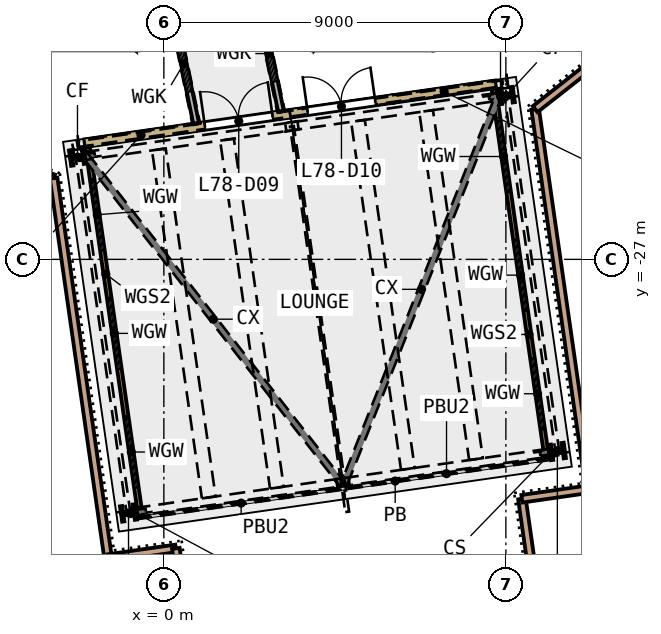
"""IFC4 building model, lengths in metres.
Left out: names, types, materials, properties, quantities, classifications, styles, units other than length and angle.
Written with IfcOpenShell. Run it as: python <this file> out.ifc"""

import sys

from ifc_helpers import new_model, si_unit, direction, frame, frame_2d, origin, origin_2d, place, context, subcontext, project, spatial, polyline, rectangle, i_section, outline, extrude, element, fill, save


model = new_model("IFC4")
c1 = context("Model", 3, precision=1e-05, world=origin(), true_north=direction((0.0, 1.0)))
c2 = subcontext(c1, "Body", "Model", "MODEL_VIEW")
j1 = project(units=[si_unit("LENGTHUNIT", "METRE"), si_unit("PLANEANGLEUNIT", "RADIAN")], contexts=[c1])
p1 = place(None, origin())
s1 = spatial("IfcSite", under=j1, at=p1, CompositionType="ELEMENT")
p2 = place(p1, origin())
s2 = spatial("IfcBuilding", under=s1, at=p2, CompositionType="ELEMENT")
p3 = place(p2, frame((0.0, 0.0, 315.0)))
s3 = spatial("IfcBuildingStorey", under=s2, at=p3, CompositionType="ELEMENT", Elevation=315.0)
for number, where, z_axis, x_axis in (
    (1, (9.012, -22.69, 0.0), (0.0, 0.0, 1.0), (0.142, -0.99, 0.0)),
    (2, (-2.273, -24.308, 0.0), (0.0, 0.0, 1.0), (0.142, -0.99, 0.0)),
    (3, (10.354, -32.055, 0.0), (0.0, 0.0, 1.0), (0.142, -0.99, 0.0)),
    (4, (-0.93, -33.673, 0.0), (0.0, 0.0, 1.0), (0.142, -0.99, 0.0)),
):
    element("IfcColumn", number, at=place(p3, frame(where, z_axis=z_axis, x_axis=x_axis)), inside=s3, PredefinedType="COLUMN", context=c2, shape_type="SweptSolid", body=[
        extrude(i_section(OverallWidth=0.368, OverallDepth=0.356, WebThickness=0.011, FlangeThickness=0.018, FilletRadius=0.015, at=origin_2d()), origin(), (0.0, 0.0, 1.0), 4.5),
    ])
p4 = place(p3, frame((-2.083, -23.943, 0.0), z_axis=(0.0, 0.0, 1.0), x_axis=(0.989877825, 0.141922135, 0.0)))
e5 = element("IfcWall", 5, at=p4, inside=s3, PredefinedType="SOLIDWALL", context=c2, shape_type="SweptSolid", body=[
    extrude(rectangle(XDim=2.73, YDim=0.2, at=frame_2d((1.365, 0.0))), origin(), (0.0, 0.0, 1.0), 2.456),
])
p5 = place(p3, frame((-2.083, -23.943, 2.71), z_axis=(0.0, 0.0, 1.0), x_axis=(0.989877825, 0.141922135, 0.0)))
e6 = element("IfcWall", 6, at=p5, inside=s3, PredefinedType="SOLIDWALL", context=c2, shape_type="SweptSolid", body=[
    extrude(rectangle(XDim=2.73, YDim=0.2, at=frame_2d((1.365, 0.0))), origin(), (0.0, 0.0, 1.0), 1.09),
])
p6 = place(p3, frame((0.62, -23.556, 0.0), z_axis=(0.0, 0.0, 1.0), x_axis=(0.989877825, 0.141922135, 0.0)))
e7 = element("IfcWall", 7, at=p6, inside=s3, PredefinedType="SOLIDWALL", context=c2, shape_type="SweptSolid", body=[
    extrude(rectangle(XDim=2.73, YDim=0.2, at=frame_2d((1.365, 0.0))), origin(), (0.0, 0.0, 1.0), 2.456),
])
p7 = place(p6, frame((0.465, 0.0, 0.0)))
e8 = element("IfcOpeningElement", 8, at=p7, cuts=e7, PredefinedType="OPENING", context=c2, shape_type="SweptSolid", body=[
    extrude(rectangle(XDim=1.8, YDim=2.1, at=frame_2d((0.9, 1.05))), frame((0.0, 0.11, 0.0), z_axis=(0.0, -1.0, 0.0), x_axis=(1.0, 0.0, 0.0)), (0.0, 0.0, 1.0), 0.22),
])
p8 = place(p3, frame((0.62, -23.556, 2.71), z_axis=(0.0, 0.0, 1.0), x_axis=(0.989877825, 0.141922135, 0.0)))
e9 = element("IfcWall", 9, at=p8, inside=s3, PredefinedType="SOLIDWALL", context=c2, shape_type="SweptSolid", body=[
    extrude(rectangle(XDim=2.73, YDim=0.2, at=frame_2d((1.365, 0.0))), origin(), (0.0, 0.0, 1.0), 1.09),
])
p9 = place(p3, frame((3.322, -23.168, 0.0), z_axis=(0.0, 0.0, 1.0), x_axis=(0.989865258, 0.14200976, 0.0)))
e10 = element("IfcWall", 10, at=p9, inside=s3, PredefinedType="SOLIDWALL", context=c2, shape_type="SweptSolid", body=[
    extrude(rectangle(XDim=2.73, YDim=0.2, at=frame_2d((1.365, 0.0))), origin(), (0.0, 0.0, 1.0), 2.456),
])
p10 = place(p9, frame((0.465, 0.0, 0.0)))
e11 = element("IfcOpeningElement", 11, at=p10, cuts=e10, PredefinedType="OPENING", context=c2, shape_type="SweptSolid", body=[
    extrude(rectangle(XDim=1.8, YDim=2.1, at=frame_2d((0.9, 1.05))), frame((0.0, 0.11, 0.0), z_axis=(0.0, -1.0, 0.0), x_axis=(1.0, 0.0, 0.0)), (0.0, 0.0, 1.0), 0.22),
])
p11 = place(p3, frame((3.322, -23.168, 2.71), z_axis=(0.0, 0.0, 1.0), x_axis=(0.989865258, 0.14200976, 0.0)))
e12 = element("IfcWall", 12, at=p11, inside=s3, PredefinedType="SOLIDWALL", context=c2, shape_type="SweptSolid", body=[
    extrude(rectangle(XDim=2.73, YDim=0.2, at=frame_2d((1.365, 0.0))), origin(), (0.0, 0.0, 1.0), 1.09),
])
p12 = place(p3, frame((6.024, -22.781, 0.0), z_axis=(0.0, 0.0, 1.0), x_axis=(0.989877825, 0.141922135, 0.0)))
e13 = element("IfcWall", 13, at=p12, inside=s3, PredefinedType="SOLIDWALL", context=c2, shape_type="SweptSolid", body=[
    extrude(rectangle(XDim=2.73, YDim=0.2, at=frame_2d((1.365, 0.0))), origin(), (0.0, 0.0, 1.0), 2.456),
])
p13 = place(p3, frame((6.024, -22.781, 2.71), z_axis=(0.0, 0.0, 1.0), x_axis=(0.989877825, 0.141922135, 0.0)))
e14 = element("IfcWall", 14, at=p13, inside=s3, PredefinedType="SOLIDWALL", context=c2, shape_type="SweptSolid", body=[
    extrude(rectangle(XDim=2.73, YDim=0.2, at=frame_2d((1.365, 0.0))), origin(), (0.0, 0.0, 1.0), 1.09),
])
p14 = place(p3, frame((-2.083, -23.943, 3.8), z_axis=(0.0, 0.0, 1.0), x_axis=(0.989877825, 0.141922135, 0.0)))
e15 = element("IfcWall", 15, at=p14, inside=s3, PredefinedType="SOLIDWALL", context=c2, shape_type="SweptSolid", body=[
    extrude(outline(polyline([(0.0, 0.0), (5.46, 0.0), (5.46, 8.718), (0.0, 1.327), (0.0, 0.0)])), frame((0.0, 0.1, 0.0), z_axis=(0.0, -1.0, 0.0), x_axis=(1.0, 0.0, 0.0)), (0.0, 0.0, 1.0), 0.2),
])
p15 = place(p3, frame((8.727, -22.393, 3.8), z_axis=(0.0, 0.0, 1.0), x_axis=(-0.989871542, -0.141965948, 0.0)))
e16 = element("IfcWall", 16, at=p15, inside=s3, PredefinedType="SOLIDWALL", context=c2, shape_type="SweptSolid", body=[
    extrude(outline(polyline([(0.0, 0.0), (5.46, 0.0), (5.46, 8.718), (0.0, 1.327), (0.0, 0.0)])), frame((0.0, 0.1, 0.0), z_axis=(0.0, -1.0, 0.0), x_axis=(1.0, 0.0, 0.0)), (0.0, 0.0, 1.0), 0.2),
])
p16 = place(p3, frame((8.682, -22.5, 0.0), z_axis=(0.0, 0.0, 1.0), x_axis=(0.141942912, -0.989874846, 0.0)))
e17 = element("IfcWall", 17, at=p16, inside=s3, PredefinedType="SOLIDWALL", context=c2, shape_type="SweptSolid", body=[
    extrude(outline(polyline([(0.0, 0.0), (9.83, 0.0), (9.836, 5.127), (9.835, 4.229), (9.83, 5.127), (9.556, 4.229), (9.555, 5.127), (0.375, 5.127), (0.374, 4.229), (0.095, 4.229), (0.094, 5.127), (0.0, 5.127), (0.0, 0.0)])), frame((0.0, 0.06, 0.0), z_axis=(0.0, -1.0, 0.0), x_axis=(1.0, 0.0, 0.0)), (0.0, 0.0, 1.0), 0.12),
])
p17 = place(p16, frame((0.861, 0.0, 0.9)))
e18 = element("IfcOpeningElement", 18, at=p17, cuts=e17, PredefinedType="OPENING", context=c2, shape_type="SweptSolid", body=[
    extrude(rectangle(XDim=1.9, YDim=2.2, at=frame_2d((0.95, 1.1))), frame((0.0, 0.07, 0.0), z_axis=(0.0, -1.0, 0.0), x_axis=(1.0, 0.0, 0.0)), (0.0, 0.0, 1.0), 0.14),
])
p18 = place(p16, frame((4.014, 0.0, 0.9)))
e19 = element("IfcOpeningElement", 19, at=p18, cuts=e17, PredefinedType="OPENING", context=c2, shape_type="SweptSolid", body=[
    extrude(rectangle(XDim=1.9, YDim=2.2, at=frame_2d((0.95, 1.1))), frame((0.0, 0.07, 0.0), z_axis=(0.0, -1.0, 0.0), x_axis=(1.0, 0.0, 0.0)), (0.0, 0.0, 1.0), 0.14),
])
p19 = place(p16, frame((7.168, 0.0, 0.9)))
e20 = element("IfcOpeningElement", 20, at=p19, cuts=e17, PredefinedType="OPENING", context=c2, shape_type="SweptSolid", body=[
    extrude(rectangle(XDim=1.9, YDim=2.2, at=frame_2d((0.95, 1.1))), frame((0.0, 0.07, 0.0), z_axis=(0.0, -1.0, 0.0), x_axis=(1.0, 0.0, 0.0)), (0.0, 0.0, 1.0), 0.14),
])
p20 = place(p3, frame((-2.009, -24.034, 0.0), z_axis=(0.0, 0.0, 1.0), x_axis=(0.141922064, -0.989877835, 0.0)))
e21 = element("IfcWall", 21, at=p20, inside=s3, PredefinedType="SOLIDWALL", context=c2, shape_type="SweptSolid", body=[
    extrude(outline(polyline([(0.0, 0.0), (9.83, 0.0), (9.836, 5.127), (9.835, 4.229), (9.83, 5.127), (9.556, 4.229), (9.555, 5.127), (0.375, 5.127), (0.374, 4.229), (0.095, 4.229), (0.094, 5.127), (0.0, 5.127), (0.0, 0.0)])), frame((0.0, 0.06, 0.0), z_axis=(0.0, -1.0, 0.0), x_axis=(1.0, 0.0, 0.0)), (0.0, 0.0, 1.0), 0.12),
])
p21 = place(p20, frame((0.861, 0.0, 0.9)))
e22 = element("IfcOpeningElement", 22, at=p21, cuts=e21, PredefinedType="OPENING", context=c2, shape_type="SweptSolid", body=[
    extrude(rectangle(XDim=1.9, YDim=2.2, at=frame_2d((0.95, 1.1))), frame((0.0, 0.07, 0.0), z_axis=(0.0, -1.0, 0.0), x_axis=(1.0, 0.0, 0.0)), (0.0, 0.0, 1.0), 0.14),
])
p22 = place(p20, frame((4.014, 0.0, 0.9)))
e23 = element("IfcOpeningElement", 23, at=p22, cuts=e21, PredefinedType="OPENING", context=c2, shape_type="SweptSolid", body=[
    extrude(rectangle(XDim=1.9, YDim=2.2, at=frame_2d((0.95, 1.1))), frame((0.0, 0.07, 0.0), z_axis=(0.0, -1.0, 0.0), x_axis=(1.0, 0.0, 0.0)), (0.0, 0.0, 1.0), 0.14),
])
p23 = place(p20, frame((7.168, 0.0, 0.9)))
e24 = element("IfcOpeningElement", 24, at=p23, cuts=e21, PredefinedType="OPENING", context=c2, shape_type="SweptSolid", body=[
    extrude(rectangle(XDim=1.9, YDim=2.2, at=frame_2d((0.95, 1.1))), frame((0.0, 0.07, 0.0), z_axis=(0.0, -1.0, 0.0), x_axis=(1.0, 0.0, 0.0)), (0.0, 0.0, 1.0), 0.14),
])
p24 = place(p3, frame((-14.996, -20.016, 0.0), z_axis=(0.0, 0.0, 1.0), x_axis=(0.928228401, -0.372010801, 0.0)))
e25 = element("IfcWall", 25, at=p24, inside=s3, PredefinedType="SOLIDWALL", context=c2, shape_type="SweptSolid", body=[
    extrude(rectangle(XDim=13.031, YDim=0.2, at=frame_2d((6.516, 0.0))), origin(), (0.0, 0.0, 1.0), 0.45),
])
p25 = place(p3, frame((-2.9, -24.864, 0.0), z_axis=(0.0, 0.0, 1.0), x_axis=(0.141925608, -0.989877327, 0.0)))
e26 = element("IfcWall", 26, at=p25, inside=s3, PredefinedType="SOLIDWALL", context=c2, shape_type="SweptSolid", body=[
    extrude(rectangle(XDim=10.099, YDim=0.2, at=frame_2d((5.05, 0.0))), origin(), (0.0, 0.0, 1.0), 0.45),
])
for number, where, z_axis, x_axis in (
    (27, (-1.467, -34.861, 0.0), (0.0, 0.0, 1.0), (0.99, 0.142, 0.0)),
    (28, (0.315, -34.606, 0.0), (0.0, 0.0, 1.0), (0.142, -0.99, 0.0)),
    (29, (9.677, -35.082, 0.0), (0.0, 0.0, 1.0), (-0.142, 0.99, 0.0)),
    (30, (9.422, -33.3, 0.0), (0.0, 0.0, 1.0), (0.99, 0.142, 0.0)),
):
    element("IfcWall", number, at=place(p3, frame(where, z_axis=z_axis, x_axis=x_axis)), inside=s3, PredefinedType="SOLIDWALL", context=c2, shape_type="SweptSolid", body=[
        extrude(rectangle(XDim=1.8, YDim=0.2, at=frame_2d((0.9, 0.0))), origin(), (0.0, 0.0, 1.0), 0.45),
    ])
p26 = place(p3, frame((11.204, -33.044, 0.0), z_axis=(0.0, 0.0, 1.0), x_axis=(-0.141925608, 0.989877327, 0.0)))
e31 = element("IfcWall", 31, at=p26, inside=s3, PredefinedType="SOLIDWALL", context=c2, shape_type="SweptSolid", body=[
    extrude(rectangle(XDim=10.099, YDim=0.2, at=frame_2d((5.05, 0.0))), origin(), (0.0, 0.0, 1.0), 0.45),
])
p27 = place(p3, frame((9.77, -23.047, 0.0), z_axis=(0.0, 0.0, 1.0), x_axis=(0.786289732, 0.617857958, 0.0)))
e32 = element("IfcWall", 32, at=p27, inside=s3, PredefinedType="SOLIDWALL", context=c2, shape_type="SweptSolid", body=[
    extrude(rectangle(XDim=13.031, YDim=0.2, at=frame_2d((6.516, 0.0))), origin(), (0.0, 0.0, 1.0), 0.45),
])
p28 = place(p3, frame((1.196, -14.0, 0.0), z_axis=(0.0, 0.0, 1.0), x_axis=(0.202880058, -0.979203596, 0.0)))
e33 = element("IfcWall", 33, at=p28, inside=s3, PredefinedType="SOLIDWALL", context=c2, shape_type="SweptSolid", body=[
    extrude(rectangle(XDim=9.295, YDim=0.15, at=frame_2d((4.647, 0.0))), origin(), (0.0, 0.0, 1.0), 2.46),
])
p29 = place(p28, frame((0.799, 0.0, 0.9)))
e34 = element("IfcOpeningElement", 34, at=p29, cuts=e33, PredefinedType="OPENING", context=c2, shape_type="SweptSolid", body=[
    extrude(rectangle(XDim=1.5, YDim=1.3, at=frame_2d((0.75, 0.65))), frame((0.0, 0.085, 0.0), z_axis=(0.0, -1.0, 0.0), x_axis=(1.0, 0.0, 0.0)), (0.0, 0.0, 1.0), 0.17),
])
p30 = place(p28, frame((3.897, 0.0, 0.9)))
e35 = element("IfcOpeningElement", 35, at=p30, cuts=e33, PredefinedType="OPENING", context=c2, shape_type="SweptSolid", body=[
    extrude(rectangle(XDim=1.5, YDim=1.3, at=frame_2d((0.75, 0.65))), frame((0.0, 0.085, 0.0), z_axis=(0.0, -1.0, 0.0), x_axis=(1.0, 0.0, 0.0)), (0.0, 0.0, 1.0), 0.17),
])
p31 = place(p28, frame((6.996, 0.0, 0.9)))
e36 = element("IfcOpeningElement", 36, at=p31, cuts=e33, PredefinedType="OPENING", context=c2, shape_type="SweptSolid", body=[
    extrude(rectangle(XDim=1.5, YDim=1.3, at=frame_2d((0.75, 0.65))), frame((0.0, 0.085, 0.0), z_axis=(0.0, -1.0, 0.0), x_axis=(1.0, 0.0, 0.0)), (0.0, 0.0, 1.0), 0.17),
])
p32 = place(p3, frame((-1.102, -14.0, 0.0), z_axis=(0.0, 0.0, 1.0), x_axis=(0.202864863, -0.979206744, 0.0)))
e37 = element("IfcWall", 37, at=p32, inside=s3, PredefinedType="SOLIDWALL", context=c2, shape_type="SweptSolid", body=[
    extrude(rectangle(XDim=9.622, YDim=0.15, at=frame_2d((4.811, 0.0))), origin(), (0.0, 0.0, 1.0), 2.46),
])
p33 = place(p32, frame((0.854, 0.0, 0.9)))
e38 = element("IfcOpeningElement", 38, at=p33, cuts=e37, PredefinedType="OPENING", context=c2, shape_type="SweptSolid", body=[
    extrude(rectangle(XDim=1.5, YDim=1.3, at=frame_2d((0.75, 0.65))), frame((0.0, 0.085, 0.0), z_axis=(0.0, -1.0, 0.0), x_axis=(1.0, 0.0, 0.0)), (0.0, 0.0, 1.0), 0.17),
])
p34 = place(p32, frame((4.061, 0.0, 0.9)))
e39 = element("IfcOpeningElement", 39, at=p34, cuts=e37, PredefinedType="OPENING", context=c2, shape_type="SweptSolid", body=[
    extrude(rectangle(XDim=1.5, YDim=1.3, at=frame_2d((0.75, 0.65))), frame((0.0, 0.085, 0.0), z_axis=(0.0, -1.0, 0.0), x_axis=(1.0, 0.0, 0.0)), (0.0, 0.0, 1.0), 0.17),
])
p35 = place(p32, frame((7.268, 0.0, 0.9)))
e40 = element("IfcOpeningElement", 40, at=p35, cuts=e37, PredefinedType="OPENING", context=c2, shape_type="SweptSolid", body=[
    extrude(rectangle(XDim=1.5, YDim=1.3, at=frame_2d((0.75, 0.65))), frame((0.0, 0.085, 0.0), z_axis=(0.0, -1.0, 0.0), x_axis=(1.0, 0.0, 0.0)), (0.0, 0.0, 1.0), 0.17),
])
p36 = place(p7, origin())
e41 = element("IfcDoor", 41, at=p36, inside=s3, OperationType="DOUBLE_DOOR_SINGLE_SWING", PredefinedType="DOOR", context=c2, shape_type="SweptSolid", body=[
    extrude(rectangle(XDim=1.8, YDim=2.1, at=frame_2d((0.9, 1.05))), frame((0.0, 0.025, 0.0), z_axis=(0.0, -1.0, 0.0), x_axis=(1.0, 0.0, 0.0)), (0.0, 0.0, 1.0), 0.05),
])
fill(e8, e41)
p37 = place(p10, origin())
e42 = element("IfcDoor", 42, at=p37, inside=s3, OperationType="DOUBLE_DOOR_SINGLE_SWING", PredefinedType="DOOR", context=c2, shape_type="SweptSolid", body=[
    extrude(rectangle(XDim=1.8, YDim=2.1, at=frame_2d((0.9, 1.05))), frame((0.0, 0.025, 0.0), z_axis=(0.0, -1.0, 0.0), x_axis=(1.0, 0.0, 0.0)), (0.0, 0.0, 1.0), 0.05),
])
fill(e11, e42)
p38 = place(p17, origin())
e43 = element("IfcWindow", 43, at=p38, inside=s3, PartitioningType="DOUBLE_PANEL_HORIZONTAL", PredefinedType="WINDOW", context=c2, shape_type="SweptSolid", body=[
    extrude(rectangle(XDim=1.9, YDim=2.2, at=frame_2d((0.95, 1.1))), frame((0.0, 0.03, 0.0), z_axis=(0.0, -1.0, 0.0), x_axis=(1.0, 0.0, 0.0)), (0.0, 0.0, 1.0), 0.06),
])
fill(e18, e43)
p39 = place(p18, origin())
e44 = element("IfcWindow", 44, at=p39, inside=s3, PartitioningType="DOUBLE_PANEL_HORIZONTAL", PredefinedType="WINDOW", context=c2, shape_type="SweptSolid", body=[
    extrude(rectangle(XDim=1.9, YDim=2.2, at=frame_2d((0.95, 1.1))), frame((0.0, 0.03, 0.0), z_axis=(0.0, -1.0, 0.0), x_axis=(1.0, 0.0, 0.0)), (0.0, 0.0, 1.0), 0.06),
])
fill(e19, e44)
p40 = place(p19, origin())
e45 = element("IfcWindow", 45, at=p40, inside=s3, PartitioningType="DOUBLE_PANEL_HORIZONTAL", PredefinedType="WINDOW", context=c2, shape_type="SweptSolid", body=[
    extrude(rectangle(XDim=1.9, YDim=2.2, at=frame_2d((0.95, 1.1))), frame((0.0, 0.03, 0.0), z_axis=(0.0, -1.0, 0.0), x_axis=(1.0, 0.0, 0.0)), (0.0, 0.0, 1.0), 0.06),
])
fill(e20, e45)
p41 = place(p21, origin())
e46 = element("IfcWindow", 46, at=p41, inside=s3, PartitioningType="DOUBLE_PANEL_HORIZONTAL", PredefinedType="WINDOW", context=c2, shape_type="SweptSolid", body=[
    extrude(rectangle(XDim=1.9, YDim=2.2, at=frame_2d((0.95, 1.1))), frame((0.0, 0.03, 0.0), z_axis=(0.0, -1.0, 0.0), x_axis=(1.0, 0.0, 0.0)), (0.0, 0.0, 1.0), 0.06),
])
fill(e22, e46)
p42 = place(p22, origin())
e47 = element("IfcWindow", 47, at=p42, inside=s3, PartitioningType="DOUBLE_PANEL_HORIZONTAL", PredefinedType="WINDOW", context=c2, shape_type="SweptSolid", body=[
    extrude(rectangle(XDim=1.9, YDim=2.2, at=frame_2d((0.95, 1.1))), frame((0.0, 0.03, 0.0), z_axis=(0.0, -1.0, 0.0), x_axis=(1.0, 0.0, 0.0)), (0.0, 0.0, 1.0), 0.06),
])
fill(e23, e47)
p43 = place(p23, origin())
e48 = element("IfcWindow", 48, at=p43, inside=s3, PartitioningType="DOUBLE_PANEL_HORIZONTAL", PredefinedType="WINDOW", context=c2, shape_type="SweptSolid", body=[
    extrude(rectangle(XDim=1.9, YDim=2.2, at=frame_2d((0.95, 1.1))), frame((0.0, 0.03, 0.0), z_axis=(0.0, -1.0, 0.0), x_axis=(1.0, 0.0, 0.0)), (0.0, 0.0, 1.0), 0.06),
])
fill(e24, e48)
p44 = place(p31, origin())
e49 = element("IfcWindow", 49, at=p44, inside=s3, PartitioningType="SINGLE_PANEL", PredefinedType="WINDOW", context=c2, shape_type="SweptSolid", body=[
    extrude(rectangle(XDim=1.5, YDim=1.3, at=frame_2d((0.75, 0.65))), frame((0.0, 0.03, 0.0), z_axis=(0.0, -1.0, 0.0), x_axis=(1.0, 0.0, 0.0)), (0.0, 0.0, 1.0), 0.06),
])
fill(e36, e49)
p45 = place(p35, origin())
e50 = element("IfcWindow", 50, at=p45, inside=s3, PartitioningType="SINGLE_PANEL", PredefinedType="WINDOW", context=c2, shape_type="SweptSolid", body=[
    extrude(rectangle(XDim=1.5, YDim=1.3, at=frame_2d((0.75, 0.65))), frame((0.0, 0.03, 0.0), z_axis=(0.0, -1.0, 0.0), x_axis=(1.0, 0.0, 0.0)), (0.0, 0.0, 1.0), 0.06),
])
fill(e40, e50)
save(model, sys.argv[1])
